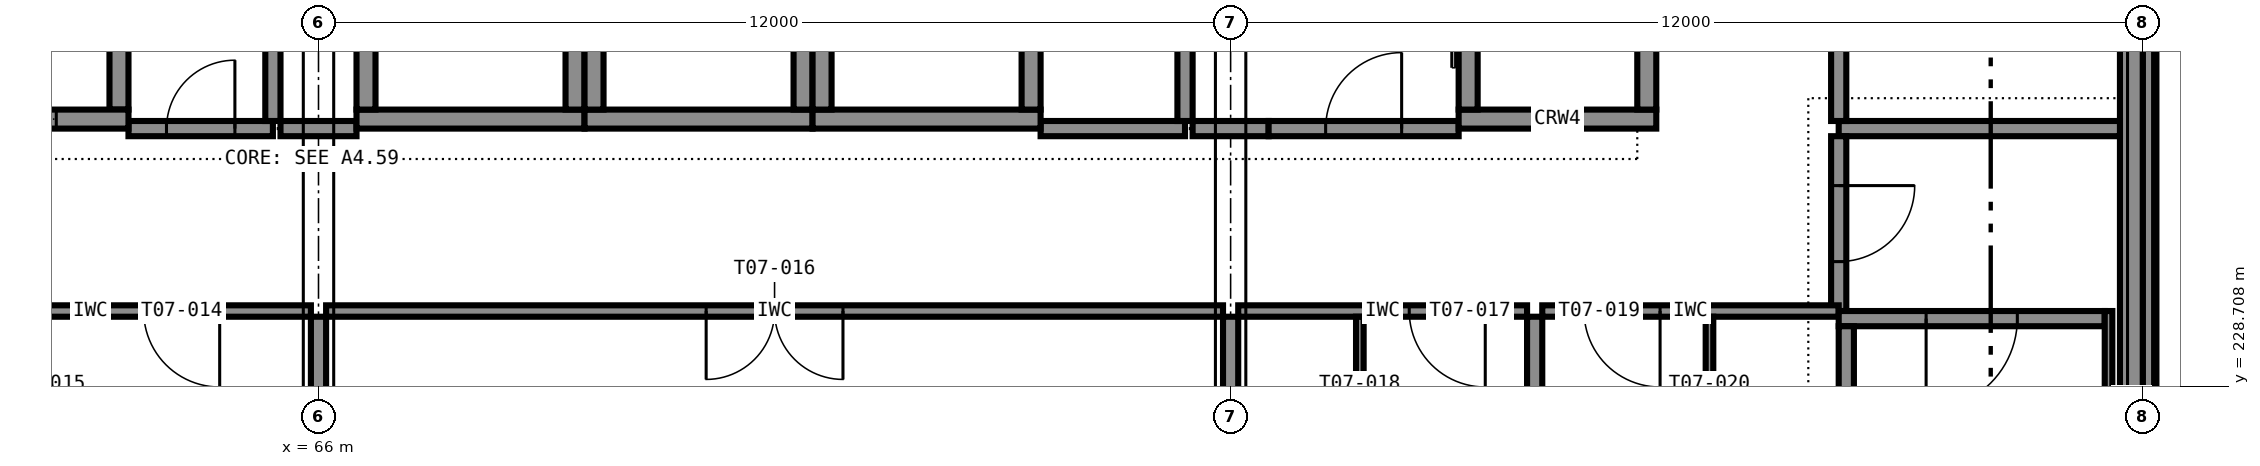
"""IFC4 building model, lengths in metres.
Left out: names, types, materials, properties, quantities, classifications, styles, units other than length and angle.
Written with IfcOpenShell. Run it as: python <this file> out.ifc"""

import sys

from ifc_helpers import new_model, si_unit, direction, frame, frame_2d, origin, place, context, subcontext, project, spatial, rectangle, extrude, element, fill, save


model = new_model("IFC4")
c1 = context("Model", 3, precision=1e-05, world=origin(), true_north=direction((0.0, 1.0)))
c2 = subcontext(c1, "Body", "Model", "MODEL_VIEW")
j1 = project(units=[si_unit("LENGTHUNIT", "METRE"), si_unit("PLANEANGLEUNIT", "RADIAN")], contexts=[c1])
p1 = place(None, origin())
s1 = spatial("IfcSite", under=j1, at=p1, CompositionType="ELEMENT")
p2 = place(p1, origin())
s2 = spatial("IfcBuilding", under=s1, at=p2, CompositionType="ELEMENT")
p3 = place(p2, frame((0.0, 0.0, 35.4)))
s3 = spatial("IfcBuildingStorey", under=s2, at=p3, CompositionType="ELEMENT", Elevation=35.4)
p4 = place(p3, frame((60.5, 232.225, 0.0), z_axis=(0.0, 0.0, 1.0), x_axis=(1.0, 0.0, 0.0)))
e1 = element("IfcWall", 1, at=p4, inside=s3, PredefinedType="SHEAR", context=c2, shape_type="SweptSolid", body=[
    extrude(rectangle(XDim=3.0, YDim=0.25, at=frame_2d((1.5, 0.0))), origin(), (0.0, 0.0, 1.0), 3.6),
])
p5 = place(p4, frame((0.95, 0.0, 0.0)))
e2 = element("IfcOpeningElement", 2, at=p5, cuts=e1, PredefinedType="OPENING", context=c2, shape_type="SweptSolid", body=[
    extrude(rectangle(XDim=1.1, YDim=2.1, at=frame_2d((0.55, 1.05))), frame((0.0, 0.135, 0.0), z_axis=(0.0, -1.0, 0.0), x_axis=(1.0, 0.0, 0.0)), (0.0, 0.0, 1.0), 0.27),
])
p6 = place(p3, frame((63.375, 232.35, 0.0), z_axis=(0.0, 0.0, 1.0), x_axis=(0.0, 1.0, 0.0)))
e3 = element("IfcWall", 3, at=p6, inside=s3, PredefinedType="SHEAR", context=c2, shape_type="SweptSolid", body=[
    extrude(rectangle(XDim=3.3, YDim=0.25, at=frame_2d((1.65, 0.0))), origin(), (0.0, 0.0, 1.0), 3.6),
])
p7 = place(p3, frame((66.5, 232.225, 0.0), z_axis=(0.0, 0.0, 1.0), x_axis=(1.0, 0.0, 0.0)))
e4 = element("IfcWall", 4, at=p7, inside=s3, PredefinedType="SHEAR", context=c2, shape_type="SweptSolid", body=[
    extrude(rectangle(XDim=3.0, YDim=0.25, at=frame_2d((1.5, 0.0))), origin(), (0.0, 0.0, 1.0), 3.6),
])
for number, where, z_axis, x_axis in (
    (5, (66.625, 232.35, 0.0), (0.0, 0.0, 1.0), (0.0, 1.0, 0.0)),
    (6, (69.375, 232.35, 0.0), (0.0, 0.0, 1.0), (0.0, 1.0, 0.0)),
):
    element("IfcWall", number, at=place(p3, frame(where, z_axis=z_axis, x_axis=x_axis)), inside=s3, PredefinedType="SHEAR", context=c2, shape_type="SweptSolid", body=[
        extrude(rectangle(XDim=3.3, YDim=0.25, at=frame_2d((1.65, 0.0))), origin(), (0.0, 0.0, 1.0), 3.6),
    ])
p8 = place(p3, frame((69.5, 232.225, 0.0), z_axis=(0.0, 0.0, 1.0), x_axis=(1.0, 0.0, 0.0)))
e7 = element("IfcWall", 7, at=p8, inside=s3, PredefinedType="SHEAR", context=c2, shape_type="SweptSolid", body=[
    extrude(rectangle(XDim=3.0, YDim=0.25, at=frame_2d((1.5, 0.0))), origin(), (0.0, 0.0, 1.0), 3.6),
])
for number, where, z_axis, x_axis in (
    (8, (69.625, 232.35, 0.0), (0.0, 0.0, 1.0), (0.0, 1.0, 0.0)),
    (9, (72.375, 232.35, 0.0), (0.0, 0.0, 1.0), (0.0, 1.0, 0.0)),
):
    element("IfcWall", number, at=place(p3, frame(where, z_axis=z_axis, x_axis=x_axis)), inside=s3, PredefinedType="SHEAR", context=c2, shape_type="SweptSolid", body=[
        extrude(rectangle(XDim=3.3, YDim=0.25, at=frame_2d((1.65, 0.0))), origin(), (0.0, 0.0, 1.0), 3.6),
    ])
p9 = place(p3, frame((72.5, 232.225, 0.0), z_axis=(0.0, 0.0, 1.0), x_axis=(1.0, 0.0, 0.0)))
e10 = element("IfcWall", 10, at=p9, inside=s3, PredefinedType="SHEAR", context=c2, shape_type="SweptSolid", body=[
    extrude(rectangle(XDim=3.0, YDim=0.25, at=frame_2d((1.5, 0.0))), origin(), (0.0, 0.0, 1.0), 3.6),
])
for number, where, z_axis, x_axis in (
    (11, (72.625, 232.35, 0.0), (0.0, 0.0, 1.0), (0.0, 1.0, 0.0)),
    (12, (75.375, 232.35, 0.0), (0.0, 0.0, 1.0), (0.0, 1.0, 0.0)),
):
    element("IfcWall", number, at=place(p3, frame(where, z_axis=z_axis, x_axis=x_axis)), inside=s3, PredefinedType="SHEAR", context=c2, shape_type="SweptSolid", body=[
        extrude(rectangle(XDim=3.3, YDim=0.25, at=frame_2d((1.65, 0.0))), origin(), (0.0, 0.0, 1.0), 3.6),
    ])
p10 = place(p3, frame((81.0, 232.225, 0.0), z_axis=(0.0, 0.0, 1.0), x_axis=(1.0, 0.0, 0.0)))
e13 = element("IfcWall", 13, at=p10, inside=s3, PredefinedType="SHEAR", context=c2, shape_type="SweptSolid", body=[
    extrude(rectangle(XDim=2.6, YDim=0.25, at=frame_2d((1.3, 0.0))), origin(), (0.0, 0.0, 1.0), 3.6),
])
p11 = place(p3, frame((81.125, 232.35, 0.0), z_axis=(0.0, 0.0, 1.0), x_axis=(0.0, 1.0, 0.0)))
e14 = element("IfcWall", 14, at=p11, inside=s3, PredefinedType="SHEAR", context=c2, shape_type="SweptSolid", body=[
    extrude(rectangle(XDim=3.3, YDim=0.25, at=frame_2d((1.65, 0.0))), origin(), (0.0, 0.0, 1.0), 3.6),
])
p12 = place(p11, frame((1.1, 0.0, 0.0)))
e15 = element("IfcOpeningElement", 15, at=p12, cuts=e14, PredefinedType="OPENING", context=c2, shape_type="SweptSolid", body=[
    extrude(rectangle(XDim=1.1, YDim=2.1, at=frame_2d((0.55, 1.05))), frame((0.0, 0.135, 0.0), z_axis=(0.0, -1.0, 0.0), x_axis=(1.0, 0.0, 0.0)), (0.0, 0.0, 1.0), 0.27),
])
p13 = place(p3, frame((83.475, 232.35, 0.0), z_axis=(0.0, 0.0, 1.0), x_axis=(0.0, 1.0, 0.0)))
e16 = element("IfcWall", 16, at=p13, inside=s3, PredefinedType="SHEAR", context=c2, shape_type="SweptSolid", body=[
    extrude(rectangle(XDim=3.3, YDim=0.25, at=frame_2d((1.65, 0.0))), origin(), (0.0, 0.0, 1.0), 3.6),
])
p14 = place(p3, frame((89.5, 229.6, 0.0), z_axis=(0.0, 0.0, 1.0), x_axis=(-1.0, 0.0, 0.0)))
e17 = element("IfcWall", 17, at=p14, inside=s3, PredefinedType="SHEAR", context=c2, shape_type="SweptSolid", body=[
    extrude(rectangle(XDim=3.5, YDim=0.2, at=frame_2d((1.75, 0.0))), origin(), (0.0, 0.0, 1.0), 3.6),
])
p15 = place(p14, frame((1.15, 0.0, 0.0)))
e18 = element("IfcOpeningElement", 18, at=p15, cuts=e17, PredefinedType="OPENING", context=c2, shape_type="SweptSolid", body=[
    extrude(rectangle(XDim=1.2, YDim=2.1, at=frame_2d((0.6, 1.05))), frame((0.0, 0.11, 0.0), z_axis=(0.0, -1.0, 0.0), x_axis=(1.0, 0.0, 0.0)), (0.0, 0.0, 1.0), 0.22),
])
p16 = place(p3, frame((86.1, 222.0, 0.0), z_axis=(0.0, 0.0, 1.0), x_axis=(0.0, 1.0, 0.0)))
e19 = element("IfcWall", 19, at=p16, inside=s3, PredefinedType="SHEAR", context=c2, shape_type="SweptSolid", body=[
    extrude(rectangle(XDim=7.5, YDim=0.2, at=frame_2d((3.75, 0.0))), origin(), (0.0, 0.0, 1.0), 3.6),
])
p17 = place(p3, frame((89.55, 229.7, 0.0), z_axis=(0.0, 0.0, 1.0), x_axis=(0.0, -1.0, 0.0)))
e20 = element("IfcWall", 20, at=p17, inside=s3, PredefinedType="SHEAR", context=c2, shape_type="SweptSolid", body=[
    extrude(rectangle(XDim=7.7, YDim=0.1, at=frame_2d((3.85, 0.0))), origin(), (0.0, 0.0, 1.0), 3.4),
])
p18 = place(p3, frame((89.85, 222.4, 0.0), z_axis=(0.0, 0.0, 1.0), x_axis=(0.0, 1.0, 0.0)))
e21 = element("IfcWall", 21, at=p18, inside=s3, PredefinedType="STANDARD", context=c2, shape_type="SweptSolid", body=[
    extrude(rectangle(XDim=11.2, YDim=0.3, at=frame_2d((5.6, 0.0))), origin(), (0.0, 0.0, 1.0), 2.6),
])
p19 = place(p3, frame((90.075, 222.4, 3.4), z_axis=(0.0, 0.0, 1.0), x_axis=(0.0, 1.0, 0.0)))
e22 = element("IfcWall", 22, at=p19, inside=s3, PredefinedType="STANDARD", context=c2, shape_type="SweptSolid", body=[
    extrude(rectangle(XDim=11.2, YDim=0.15, at=frame_2d((5.6, 0.0))), origin(), (0.0, 0.0, 1.0), 0.2),
])
p20 = place(p3, frame((63.5, 232.1, 0.0), z_axis=(0.0, 0.0, 1.0), x_axis=(1.0, 0.0, 0.0)))
e23 = element("IfcWall", 23, at=p20, inside=s3, PredefinedType="PARTITIONING", context=c2, shape_type="SweptSolid", body=[
    extrude(rectangle(XDim=1.9, YDim=0.2, at=frame_2d((0.95, 0.0))), origin(), (0.0, 0.0, 1.0), 3.4),
])
p21 = place(p20, frame((0.5, 0.0, 0.0)))
e24 = element("IfcOpeningElement", 24, at=p21, cuts=e23, PredefinedType="OPENING", context=c2, shape_type="SweptSolid", body=[
    extrude(rectangle(XDim=0.9, YDim=2.1, at=frame_2d((0.45, 1.05))), frame((0.0, 0.11, 0.0), z_axis=(0.0, -1.0, 0.0), x_axis=(1.0, 0.0, 0.0)), (0.0, 0.0, 1.0), 0.22),
])
p22 = place(p3, frame((65.5, 232.1, 0.0), z_axis=(0.0, 0.0, 1.0), x_axis=(1.0, 0.0, 0.0)))
e25 = element("IfcWall", 25, at=p22, inside=s3, PredefinedType="PARTITIONING", context=c2, shape_type="SweptSolid", body=[
    extrude(rectangle(XDim=1.0, YDim=0.2, at=frame_2d((0.5, 0.0))), origin(), (0.0, 0.0, 1.0), 3.4),
])
p23 = place(p3, frame((75.5, 232.1, 0.0), z_axis=(0.0, 0.0, 1.0), x_axis=(1.0, 0.0, 0.0)))
e26 = element("IfcWall", 26, at=p23, inside=s3, PredefinedType="PARTITIONING", context=c2, shape_type="SweptSolid", body=[
    extrude(rectangle(XDim=1.9, YDim=0.2, at=frame_2d((0.95, 0.0))), origin(), (0.0, 0.0, 1.0), 3.4),
])
p24 = place(p3, frame((77.5, 232.1, 0.0), z_axis=(0.0, 0.0, 1.0), x_axis=(1.0, 0.0, 0.0)))
e27 = element("IfcWall", 27, at=p24, inside=s3, PredefinedType="PARTITIONING", context=c2, shape_type="SweptSolid", body=[
    extrude(rectangle(XDim=1.0, YDim=0.2, at=frame_2d((0.5, 0.0))), origin(), (0.0, 0.0, 1.0), 3.4),
])
p25 = place(p3, frame((78.5, 232.1, 0.0), z_axis=(0.0, 0.0, 1.0), x_axis=(1.0, 0.0, 0.0)))
e28 = element("IfcWall", 28, at=p25, inside=s3, PredefinedType="PARTITIONING", context=c2, shape_type="SweptSolid", body=[
    extrude(rectangle(XDim=2.5, YDim=0.2, at=frame_2d((1.25, 0.0))), origin(), (0.0, 0.0, 1.0), 3.4),
])
p26 = place(p25, frame((0.75, 0.0, 0.0)))
e29 = element("IfcOpeningElement", 29, at=p26, cuts=e28, PredefinedType="OPENING", context=c2, shape_type="SweptSolid", body=[
    extrude(rectangle(XDim=1.0, YDim=2.1, at=frame_2d((0.5, 1.05))), frame((0.0, 0.11, 0.0), z_axis=(0.0, -1.0, 0.0), x_axis=(1.0, 0.0, 0.0)), (0.0, 0.0, 1.0), 0.22),
])
p27 = place(p3, frame((86.0, 232.1, 0.0), z_axis=(0.0, 0.0, 1.0), x_axis=(1.0, 0.0, 0.0)))
e30 = element("IfcWall", 30, at=p27, inside=s3, PredefinedType="PARTITIONING", context=c2, shape_type="SweptSolid", body=[
    extrude(rectangle(XDim=3.7, YDim=0.2, at=frame_2d((1.85, 0.0))), origin(), (0.0, 0.0, 1.0), 3.4),
])
for number, where, z_axis, x_axis in (
    (31, (65.4, 232.2, 0.0), (0.0, 0.0, 1.0), (0.0, 1.0, 0.0)),
    (32, (77.4, 232.2, 0.0), (0.0, 0.0, 1.0), (0.0, 1.0, 0.0)),
):
    element("IfcWall", number, at=place(p3, frame(where, z_axis=z_axis, x_axis=x_axis)), inside=s3, PredefinedType="PARTITIONING", context=c2, shape_type="SweptSolid", body=[
        extrude(rectangle(XDim=3.6, YDim=0.2, at=frame_2d((1.8, 0.0))), origin(), (0.0, 0.0, 1.0), 3.4),
    ])
p28 = place(p3, frame((86.0, 235.8, 0.0), z_axis=(0.0, 0.0, 1.0), x_axis=(0.0, -1.0, 0.0)))
e33 = element("IfcWall", 33, at=p28, inside=s3, PredefinedType="PARTITIONING", context=c2, shape_type="SweptSolid", body=[
    extrude(rectangle(XDim=3.6, YDim=0.2, at=frame_2d((1.8, 0.0))), origin(), (0.0, 0.0, 1.0), 3.4),
])
p29 = place(p28, frame((1.35, 0.0, 0.0)))
e34 = element("IfcOpeningElement", 34, at=p29, cuts=e33, PredefinedType="OPENING", context=c2, shape_type="SweptSolid", body=[
    extrude(rectangle(XDim=0.9, YDim=2.1, at=frame_2d((0.45, 1.05))), frame((0.0, 0.11, 0.0), z_axis=(0.0, -1.0, 0.0), x_axis=(1.0, 0.0, 0.0)), (0.0, 0.0, 1.0), 0.22),
])
p30 = place(p3, frame((86.0, 232.0, 0.0), z_axis=(0.0, 0.0, 1.0), x_axis=(0.0, -1.0, 0.0)))
e35 = element("IfcWall", 35, at=p30, inside=s3, PredefinedType="PARTITIONING", context=c2, shape_type="SweptSolid", body=[
    extrude(rectangle(XDim=2.3, YDim=0.2, at=frame_2d((1.15, 0.0))), origin(), (0.0, 0.0, 1.0), 3.4),
])
p31 = place(p30, frame((0.65, 0.0, 0.0)))
e36 = element("IfcOpeningElement", 36, at=p31, cuts=e35, PredefinedType="OPENING", context=c2, shape_type="SweptSolid", body=[
    extrude(rectangle(XDim=1.0, YDim=2.1, at=frame_2d((0.5, 1.05))), frame((0.0, 0.11, 0.0), z_axis=(0.0, -1.0, 0.0), x_axis=(1.0, 0.0, 0.0)), (0.0, 0.0, 1.0), 0.22),
])
p32 = place(p3, frame((65.9, 229.7, 0.0), z_axis=(0.0, 0.0, 1.0), x_axis=(-1.0, 0.0, 0.0)))
e37 = element("IfcWall", 37, at=p32, inside=s3, PredefinedType="PARTITIONING", context=c2, shape_type="SweptSolid", body=[
    extrude(rectangle(XDim=5.8, YDim=0.15, at=frame_2d((2.9, 0.0))), origin(), (0.0, 0.0, 1.0), 3.4),
])
p33 = place(p32, frame((1.2, 0.0, 0.0)))
e38 = element("IfcOpeningElement", 38, at=p33, cuts=e37, PredefinedType="OPENING", context=c2, shape_type="SweptSolid", body=[
    extrude(rectangle(XDim=1.0, YDim=2.1, at=frame_2d((0.5, 1.05))), frame((0.0, 0.085, 0.0), z_axis=(0.0, -1.0, 0.0), x_axis=(1.0, 0.0, 0.0)), (0.0, 0.0, 1.0), 0.17),
])
p34 = place(p3, frame((77.9, 229.7, 0.0), z_axis=(0.0, 0.0, 1.0), x_axis=(-1.0, 0.0, 0.0)))
e39 = element("IfcWall", 39, at=p34, inside=s3, PredefinedType="PARTITIONING", context=c2, shape_type="SweptSolid", body=[
    extrude(rectangle(XDim=11.8, YDim=0.15, at=frame_2d((5.9, 0.0))), origin(), (0.0, 0.0, 1.0), 3.4),
])
p35 = place(p34, frame((5.0, 0.0, 0.0)))
e40 = element("IfcOpeningElement", 40, at=p35, cuts=e39, PredefinedType="OPENING", context=c2, shape_type="SweptSolid", body=[
    extrude(rectangle(XDim=1.8, YDim=2.1, at=frame_2d((0.9, 1.05))), frame((0.0, 0.085, 0.0), z_axis=(0.0, -1.0, 0.0), x_axis=(1.0, 0.0, 0.0)), (0.0, 0.0, 1.0), 0.17),
])
p36 = place(p3, frame((81.9, 229.7, 0.0), z_axis=(0.0, 0.0, 1.0), x_axis=(-1.0, 0.0, 0.0)))
e41 = element("IfcWall", 41, at=p36, inside=s3, PredefinedType="PARTITIONING", context=c2, shape_type="SweptSolid", body=[
    extrude(rectangle(XDim=3.8, YDim=0.15, at=frame_2d((1.9, 0.0))), origin(), (0.0, 0.0, 1.0), 3.4),
])
p37 = place(p36, frame((0.55, 0.0, 0.0)))
e42 = element("IfcOpeningElement", 42, at=p37, cuts=e41, PredefinedType="OPENING", context=c2, shape_type="SweptSolid", body=[
    extrude(rectangle(XDim=1.0, YDim=2.1, at=frame_2d((0.5, 1.05))), frame((0.0, 0.085, 0.0), z_axis=(0.0, -1.0, 0.0), x_axis=(1.0, 0.0, 0.0)), (0.0, 0.0, 1.0), 0.17),
])
p38 = place(p3, frame((79.7, 229.625, 0.0), z_axis=(0.0, 0.0, 1.0), x_axis=(0.0, -1.0, 0.0)))
e43 = element("IfcWall", 43, at=p38, inside=s3, PredefinedType="PARTITIONING", context=c2, shape_type="SweptSolid", body=[
    extrude(rectangle(XDim=2.875, YDim=0.1, at=frame_2d((1.438, 0.0))), origin(), (0.0, 0.0, 1.0), 3.4),
])
p39 = place(p38, frame((1.038, 0.0, 0.0)))
e44 = element("IfcOpeningElement", 44, at=p39, cuts=e43, PredefinedType="OPENING", context=c2, shape_type="SweptSolid", body=[
    extrude(rectangle(XDim=0.8, YDim=2.1, at=frame_2d((0.4, 1.05))), frame((0.0, 0.06, 0.0), z_axis=(0.0, -1.0, 0.0), x_axis=(1.0, 0.0, 0.0)), (0.0, 0.0, 1.0), 0.12),
])
p40 = place(p3, frame((86.0, 229.7, 0.0), z_axis=(0.0, 0.0, 1.0), x_axis=(-1.0, 0.0, 0.0)))
e45 = element("IfcWall", 45, at=p40, inside=s3, PredefinedType="PARTITIONING", context=c2, shape_type="SweptSolid", body=[
    extrude(rectangle(XDim=3.9, YDim=0.15, at=frame_2d((1.95, 0.0))), origin(), (0.0, 0.0, 1.0), 3.4),
])
p41 = place(p40, frame((2.35, 0.0, 0.0)))
e46 = element("IfcOpeningElement", 46, at=p41, cuts=e45, PredefinedType="OPENING", context=c2, shape_type="SweptSolid", body=[
    extrude(rectangle(XDim=1.0, YDim=2.1, at=frame_2d((0.5, 1.05))), frame((0.0, 0.085, 0.0), z_axis=(0.0, -1.0, 0.0), x_axis=(1.0, 0.0, 0.0)), (0.0, 0.0, 1.0), 0.17),
])
p42 = place(p3, frame((84.3, 226.75, 0.0), z_axis=(0.0, 0.0, 1.0), x_axis=(0.0, 1.0, 0.0)))
e47 = element("IfcWall", 47, at=p42, inside=s3, PredefinedType="PARTITIONING", context=c2, shape_type="SweptSolid", body=[
    extrude(rectangle(XDim=2.875, YDim=0.1, at=frame_2d((1.438, 0.0))), origin(), (0.0, 0.0, 1.0), 3.4),
])
p43 = place(p42, frame((1.038, 0.0, 0.0)))
e48 = element("IfcOpeningElement", 48, at=p43, cuts=e47, PredefinedType="OPENING", context=c2, shape_type="SweptSolid", body=[
    extrude(rectangle(XDim=0.8, YDim=2.1, at=frame_2d((0.4, 1.05))), frame((0.0, 0.06, 0.0), z_axis=(0.0, -1.0, 0.0), x_axis=(1.0, 0.0, 0.0)), (0.0, 0.0, 1.0), 0.12),
])
for number, where, z_axis, x_axis in (
    (49, (66.0, 222.4, 0.0), (0.0, 0.0, 1.0), (0.0, 1.0, 0.0)),
    (50, (78.0, 222.4, 0.0), (0.0, 0.0, 1.0), (0.0, 1.0, 0.0)),
):
    element("IfcWall", number, at=place(p3, frame(where, z_axis=z_axis, x_axis=x_axis)), inside=s3, PredefinedType="PARTITIONING", context=c2, shape_type="SweptSolid", body=[
        extrude(rectangle(XDim=7.225, YDim=0.2, at=frame_2d((3.613, 0.0))), origin(), (0.0, 0.0, 1.0), 2.6),
    ])
p44 = place(p3, frame((82.0, 222.3, 0.0), z_axis=(0.0, 0.0, 1.0), x_axis=(0.0, 1.0, 0.0)))
e51 = element("IfcWall", 51, at=p44, inside=s3, PredefinedType="PARTITIONING", context=c2, shape_type="SweptSolid", body=[
    extrude(rectangle(XDim=7.325, YDim=0.2, at=frame_2d((3.663, 0.0))), origin(), (0.0, 0.0, 1.0), 3.4),
])
p45 = place(p21, origin())
e52 = element("IfcDoor", 52, at=p45, inside=s3, OperationType="SINGLE_SWING_RIGHT", PredefinedType="DOOR", context=c2, shape_type="SweptSolid", body=[
    extrude(rectangle(XDim=0.9, YDim=2.1, at=frame_2d((0.45, 1.05))), frame((0.0, 0.025, 0.0), z_axis=(0.0, -1.0, 0.0), x_axis=(1.0, 0.0, 0.0)), (0.0, 0.0, 1.0), 0.05),
])
fill(e24, e52)
p46 = place(p26, origin())
e53 = element("IfcDoor", 53, at=p46, inside=s3, OperationType="SINGLE_SWING_RIGHT", PredefinedType="DOOR", context=c2, shape_type="SweptSolid", body=[
    extrude(rectangle(XDim=1.0, YDim=2.1, at=frame_2d((0.5, 1.05))), frame((0.0, 0.025, 0.0), z_axis=(0.0, -1.0, 0.0), x_axis=(1.0, 0.0, 0.0)), (0.0, 0.0, 1.0), 0.05),
])
fill(e29, e53)
p47 = place(p31, origin())
e54 = element("IfcDoor", 54, at=p47, inside=s3, OperationType="SINGLE_SWING_LEFT", PredefinedType="DOOR", context=c2, shape_type="SweptSolid", body=[
    extrude(rectangle(XDim=1.0, YDim=2.1, at=frame_2d((0.5, 1.05))), frame((0.0, 0.025, 0.0), z_axis=(0.0, -1.0, 0.0), x_axis=(1.0, 0.0, 0.0)), (0.0, 0.0, 1.0), 0.05),
])
fill(e36, e54)
p48 = place(p33, origin())
e55 = element("IfcDoor", 55, at=p48, inside=s3, OperationType="SINGLE_SWING_LEFT", PredefinedType="DOOR", context=c2, shape_type="SweptSolid", body=[
    extrude(rectangle(XDim=1.0, YDim=2.1, at=frame_2d((0.5, 1.05))), frame((0.0, 0.025, 0.0), z_axis=(0.0, -1.0, 0.0), x_axis=(1.0, 0.0, 0.0)), (0.0, 0.0, 1.0), 0.05),
])
fill(e38, e55)
p49 = place(p35, origin())
e56 = element("IfcDoor", 56, at=p49, inside=s3, OperationType="DOUBLE_DOOR_SINGLE_SWING", PredefinedType="DOOR", context=c2, shape_type="SweptSolid", body=[
    extrude(rectangle(XDim=1.8, YDim=2.1, at=frame_2d((0.9, 1.05))), frame((0.0, 0.025, 0.0), z_axis=(0.0, -1.0, 0.0), x_axis=(1.0, 0.0, 0.0)), (0.0, 0.0, 1.0), 0.05),
])
fill(e40, e56)
p50 = place(p37, origin())
e57 = element("IfcDoor", 57, at=p50, inside=s3, OperationType="SINGLE_SWING_LEFT", PredefinedType="DOOR", context=c2, shape_type="SweptSolid", body=[
    extrude(rectangle(XDim=1.0, YDim=2.1, at=frame_2d((0.5, 1.05))), frame((0.0, 0.025, 0.0), z_axis=(0.0, -1.0, 0.0), x_axis=(1.0, 0.0, 0.0)), (0.0, 0.0, 1.0), 0.05),
])
fill(e42, e57)
p51 = place(p41, origin())
e58 = element("IfcDoor", 58, at=p51, inside=s3, OperationType="SINGLE_SWING_LEFT", PredefinedType="DOOR", context=c2, shape_type="SweptSolid", body=[
    extrude(rectangle(XDim=1.0, YDim=2.1, at=frame_2d((0.5, 1.05))), frame((0.0, 0.025, 0.0), z_axis=(0.0, -1.0, 0.0), x_axis=(1.0, 0.0, 0.0)), (0.0, 0.0, 1.0), 0.05),
])
fill(e46, e58)
p52 = place(p5, origin())
e59 = element("IfcDoor", 59, at=p52, inside=s3, OperationType="SLIDING_TO_LEFT", PredefinedType="DOOR", context=c2, shape_type="SweptSolid", body=[
    extrude(rectangle(XDim=1.1, YDim=2.1, at=frame_2d((0.55, 1.05))), frame((0.0, 0.025, 0.0), z_axis=(0.0, -1.0, 0.0), x_axis=(1.0, 0.0, 0.0)), (0.0, 0.0, 1.0), 0.05),
])
fill(e2, e59)
p53 = place(p15, origin())
e60 = element("IfcDoor", 60, at=p53, inside=s3, OperationType="SINGLE_SWING_RIGHT", PredefinedType="DOOR", context=c2, shape_type="SweptSolid", body=[
    extrude(rectangle(XDim=1.2, YDim=2.1, at=frame_2d((0.6, 1.05))), frame((0.0, 0.025, 0.0), z_axis=(0.0, -1.0, 0.0), x_axis=(1.0, 0.0, 0.0)), (0.0, 0.0, 1.0), 0.05),
])
fill(e18, e60)
save(model, sys.argv[1])
